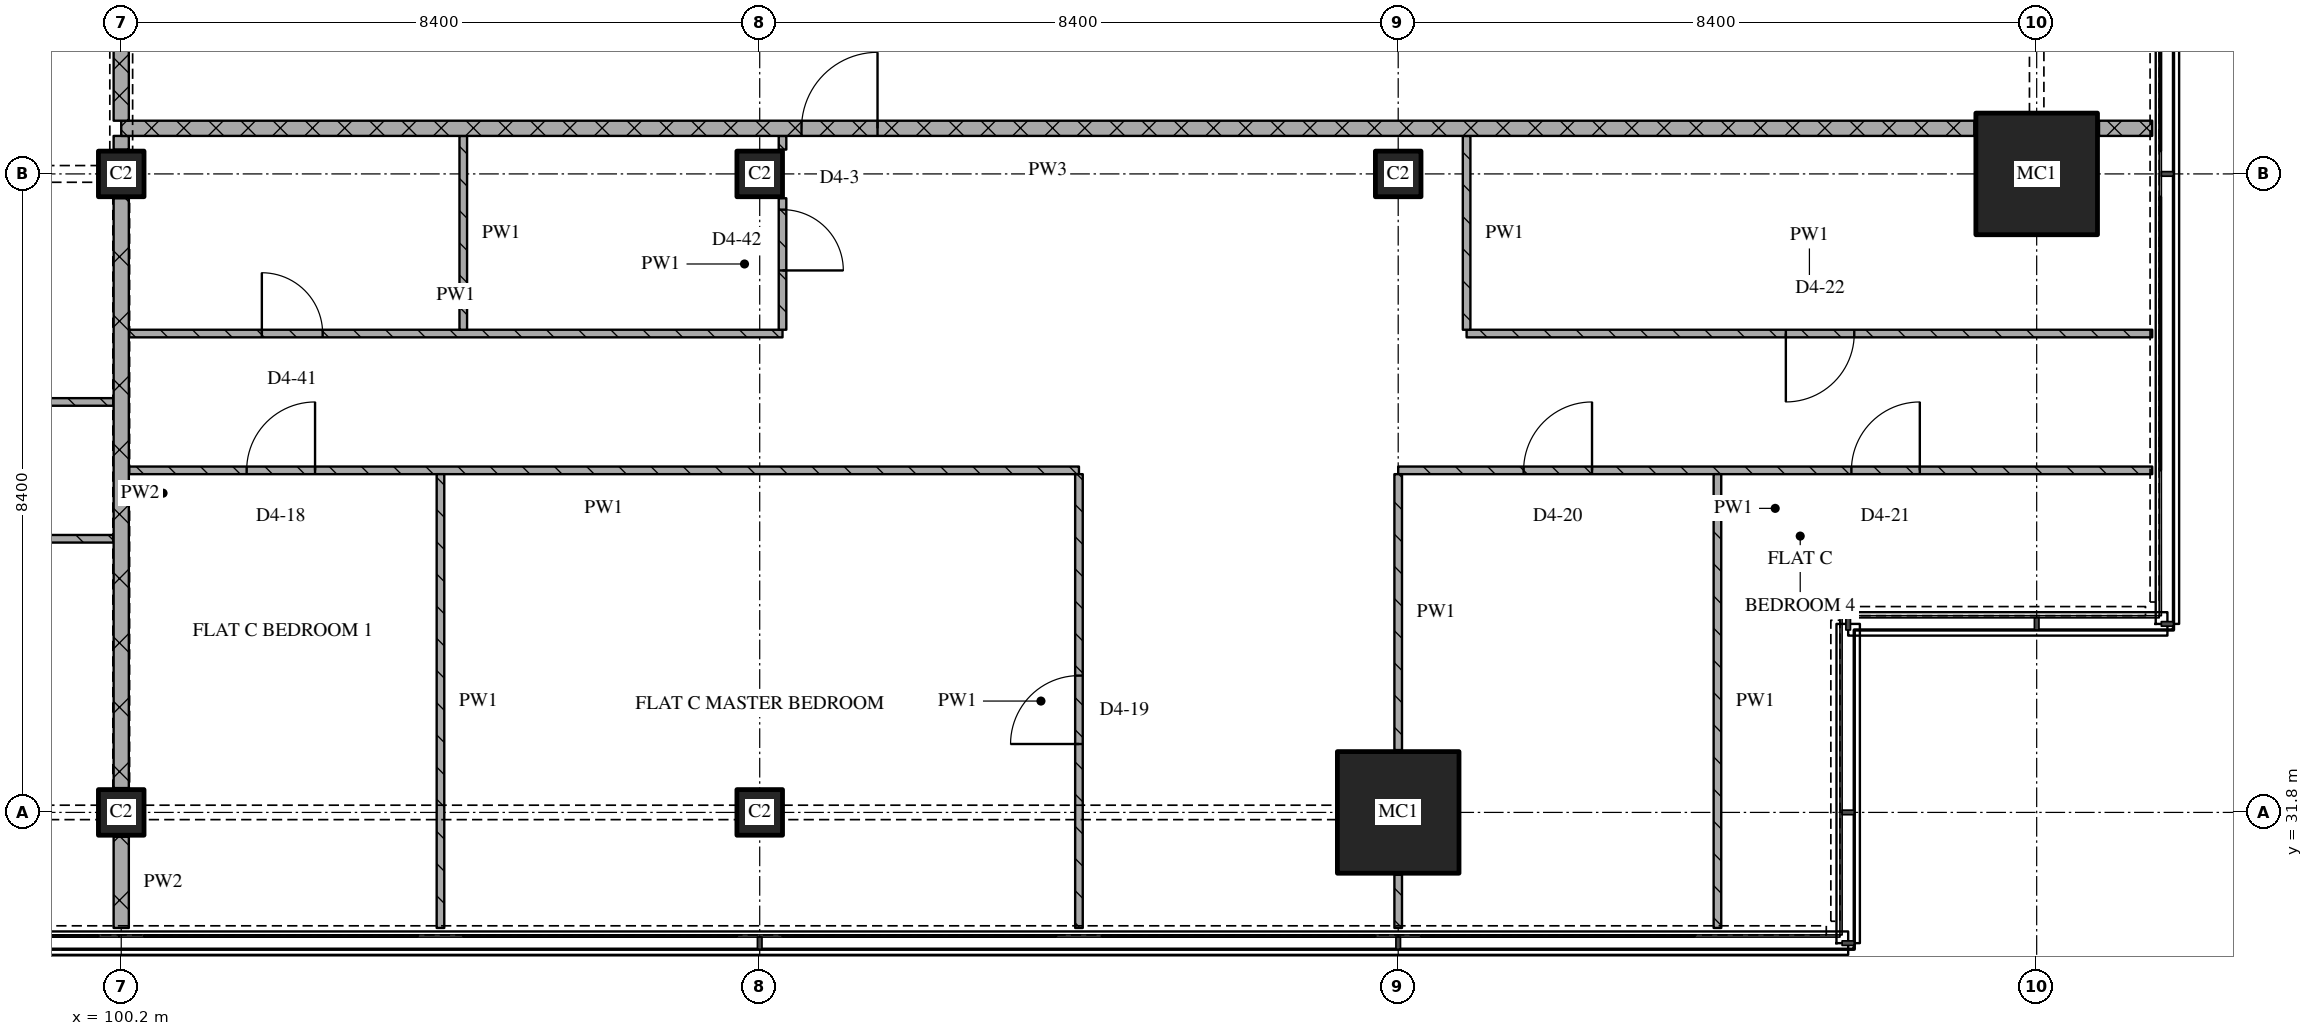
"""IFC4 building model, lengths in metres.
Left out: names, types, materials, properties, quantities, classifications, styles, units other than length and angle.
Written with IfcOpenShell. Run it as: python <this file> out.ifc"""

import sys

from ifc_helpers import new_model, si_unit, direction, frame, frame_2d, origin, origin_2d, place, context, subcontext, project, spatial, rectangle, extrude, element, fill, save


model = new_model("IFC4")
c1 = context("Model", 3, precision=1e-05, world=origin(), true_north=direction((0.0, 1.0)))
c2 = subcontext(c1, "Body", "Model", "MODEL_VIEW")
j1 = project(units=[si_unit("LENGTHUNIT", "METRE"), si_unit("PLANEANGLEUNIT", "RADIAN")], contexts=[c1])
p1 = place(None, origin())
s1 = spatial("IfcSite", under=j1, at=p1, CompositionType="ELEMENT")
p2 = place(p1, origin())
s2 = spatial("IfcBuilding", under=s1, at=p2, CompositionType="ELEMENT")
p3 = place(p2, frame((0.0, 0.0, 245.1)))
s3 = spatial("IfcBuildingStorey", under=s2, at=p3, CompositionType="ELEMENT", Elevation=245.1)
for number, where, z_axis, x_axis in (
    (1, (100.2, 31.8, 0.0), (0.0, 0.0, 1.0), (1.0, 0.0, 0.0)),
    (2, (100.2, 40.2, 0.0), (0.0, 0.0, 1.0), (1.0, 0.0, 0.0)),
    (3, (108.6, 31.8, 0.0), (0.0, 0.0, 1.0), (1.0, 0.0, 0.0)),
    (4, (108.6, 40.2, 0.0), (0.0, 0.0, 1.0), (1.0, 0.0, 0.0)),
):
    element("IfcColumn", number, at=place(p3, frame(where, z_axis=z_axis, x_axis=x_axis)), inside=s3, PredefinedType="COLUMN", context=c2, shape_type="SweptSolid", body=[
        extrude(rectangle(XDim=0.6, YDim=0.6, at=origin_2d()), origin(), (0.0, 0.0, 1.0), 3.6),
    ])
p4 = place(p3, frame((117.0, 31.8, 0.0), z_axis=(0.0, 0.0, 1.0), x_axis=(1.0, 0.0, 0.0)))
e5 = element("IfcColumn", 5, at=p4, inside=s3, PredefinedType="COLUMN", context=c2, shape_type="SweptSolid", body=[
    extrude(rectangle(XDim=1.6, YDim=1.6, at=origin_2d()), origin(), (0.0, 0.0, 1.0), 3.6),
])
p5 = place(p3, frame((117.0, 40.2, 0.0), z_axis=(0.0, 0.0, 1.0), x_axis=(1.0, 0.0, 0.0)))
e6 = element("IfcColumn", 6, at=p5, inside=s3, PredefinedType="COLUMN", context=c2, shape_type="SweptSolid", body=[
    extrude(rectangle(XDim=0.6, YDim=0.6, at=origin_2d()), origin(), (0.0, 0.0, 1.0), 3.6),
])
p6 = place(p3, frame((125.4, 40.2, 0.0), z_axis=(0.0, 0.0, 1.0), x_axis=(1.0, 0.0, 0.0)))
e7 = element("IfcColumn", 7, at=p6, inside=s3, PredefinedType="COLUMN", context=c2, shape_type="SweptSolid", body=[
    extrude(rectangle(XDim=1.6, YDim=1.6, at=origin_2d()), origin(), (0.0, 0.0, 1.0), 3.6),
])
p7 = place(p3, frame((100.1, 35.4, 0.0), z_axis=(0.0, 0.0, 1.0), x_axis=(-1.0, 0.0, 0.0)))
e8 = element("IfcWall", 8, at=p7, inside=s3, PredefinedType="PARTITIONING", context=c2, shape_type="SweptSolid", body=[
    extrude(rectangle(XDim=20.9, YDim=0.1, at=frame_2d((10.45, 0.0))), origin(), (0.0, 0.0, 1.0), 3.32),
])
p8 = place(p7, frame((1.55, 0.0, 0.0)))
e9 = element("IfcOpeningElement", 9, at=p8, cuts=e8, PredefinedType="OPENING", context=c2, shape_type="SweptSolid", body=[
    extrude(rectangle(XDim=0.9, YDim=2.1, at=frame_2d((0.45, 1.05))), frame((0.0, 0.06, 0.0), z_axis=(0.0, -1.0, 0.0), x_axis=(1.0, 0.0, 0.0)), (0.0, 0.0, 1.0), 0.12),
])
p9 = place(p7, frame((7.85, 0.0, 0.0)))
e10 = element("IfcOpeningElement", 10, at=p9, cuts=e8, PredefinedType="OPENING", context=c2, shape_type="SweptSolid", body=[
    extrude(rectangle(XDim=0.9, YDim=2.1, at=frame_2d((0.45, 1.05))), frame((0.0, 0.06, 0.0), z_axis=(0.0, -1.0, 0.0), x_axis=(1.0, 0.0, 0.0)), (0.0, 0.0, 1.0), 0.12),
])
p10 = place(p7, frame((16.25, 0.0, 0.0)))
e11 = element("IfcOpeningElement", 11, at=p10, cuts=e8, PredefinedType="OPENING", context=c2, shape_type="SweptSolid", body=[
    extrude(rectangle(XDim=0.9, YDim=2.1, at=frame_2d((0.45, 1.05))), frame((0.0, 0.06, 0.0), z_axis=(0.0, -1.0, 0.0), x_axis=(1.0, 0.0, 0.0)), (0.0, 0.0, 1.0), 0.12),
])
p11 = place(p3, frame((112.8, 36.3, 0.0), z_axis=(0.0, 0.0, 1.0), x_axis=(-1.0, 0.0, 0.0)))
e12 = element("IfcWall", 12, at=p11, inside=s3, PredefinedType="PARTITIONING", context=c2, shape_type="SweptSolid", body=[
    extrude(rectangle(XDim=12.5, YDim=0.1, at=frame_2d((6.25, 0.0))), origin(), (0.0, 0.0, 1.0), 3.32),
])
p12 = place(p11, frame((10.05, 0.0, 0.0)))
e13 = element("IfcOpeningElement", 13, at=p12, cuts=e12, PredefinedType="OPENING", context=c2, shape_type="SweptSolid", body=[
    extrude(rectangle(XDim=0.9, YDim=2.1, at=frame_2d((0.45, 1.05))), frame((0.0, 0.06, 0.0), z_axis=(0.0, -1.0, 0.0), x_axis=(1.0, 0.0, 0.0)), (0.0, 0.0, 1.0), 0.12),
])
p13 = place(p3, frame((126.92, 36.3, 0.0), z_axis=(0.0, 0.0, 1.0), x_axis=(-1.0, 0.0, 0.0)))
e14 = element("IfcWall", 14, at=p13, inside=s3, PredefinedType="PARTITIONING", context=c2, shape_type="SweptSolid", body=[
    extrude(rectangle(XDim=9.92, YDim=0.1, at=frame_2d((4.96, 0.0))), origin(), (0.0, 0.0, 1.0), 3.32),
])
p14 = place(p13, frame((3.058, 0.0, 0.0)))
e15 = element("IfcOpeningElement", 15, at=p14, cuts=e14, PredefinedType="OPENING", context=c2, shape_type="SweptSolid", body=[
    extrude(rectangle(XDim=0.9, YDim=2.1, at=frame_2d((0.45, 1.05))), frame((0.0, 0.06, 0.0), z_axis=(0.0, -1.0, 0.0), x_axis=(1.0, 0.0, 0.0)), (0.0, 0.0, 1.0), 0.12),
])
p15 = place(p13, frame((7.37, 0.0, 0.0)))
e16 = element("IfcOpeningElement", 16, at=p15, cuts=e14, PredefinedType="OPENING", context=c2, shape_type="SweptSolid", body=[
    extrude(rectangle(XDim=0.9, YDim=2.1, at=frame_2d((0.45, 1.05))), frame((0.0, 0.06, 0.0), z_axis=(0.0, -1.0, 0.0), x_axis=(1.0, 0.0, 0.0)), (0.0, 0.0, 1.0), 0.12),
])
p16 = place(p3, frame((91.2, 37.2, 0.0), z_axis=(0.0, 0.0, 1.0), x_axis=(1.0, 0.0, 0.0)))
e17 = element("IfcWall", 17, at=p16, inside=s3, PredefinedType="PARTITIONING", context=c2, shape_type="SweptSolid", body=[
    extrude(rectangle(XDim=8.9, YDim=0.1, at=frame_2d((4.45, 0.0))), origin(), (0.0, 0.0, 1.0), 3.32),
])
p17 = place(p16, frame((6.308, 0.0, 0.0)))
e18 = element("IfcOpeningElement", 18, at=p17, cuts=e17, PredefinedType="OPENING", context=c2, shape_type="SweptSolid", body=[
    extrude(rectangle(XDim=0.8, YDim=2.1, at=frame_2d((0.4, 1.05))), frame((0.0, 0.06, 0.0), z_axis=(0.0, -1.0, 0.0), x_axis=(1.0, 0.0, 0.0)), (0.0, 0.0, 1.0), 0.12),
])
p18 = place(p3, frame((100.3, 38.1, 0.0), z_axis=(0.0, 0.0, 1.0), x_axis=(1.0, 0.0, 0.0)))
e19 = element("IfcWall", 19, at=p18, inside=s3, PredefinedType="PARTITIONING", context=c2, shape_type="SweptSolid", body=[
    extrude(rectangle(XDim=8.6, YDim=0.1, at=frame_2d((4.3, 0.0))), origin(), (0.0, 0.0, 1.0), 3.32),
])
p19 = place(p18, frame((1.75, 0.0, 0.0)))
e20 = element("IfcOpeningElement", 20, at=p19, cuts=e19, PredefinedType="OPENING", context=c2, shape_type="SweptSolid", body=[
    extrude(rectangle(XDim=0.8, YDim=2.1, at=frame_2d((0.4, 1.05))), frame((0.0, 0.06, 0.0), z_axis=(0.0, -1.0, 0.0), x_axis=(1.0, 0.0, 0.0)), (0.0, 0.0, 1.0), 0.12),
])
p20 = place(p3, frame((117.9, 38.1, 0.0), z_axis=(0.0, 0.0, 1.0), x_axis=(1.0, 0.0, 0.0)))
e21 = element("IfcWall", 21, at=p20, inside=s3, PredefinedType="PARTITIONING", context=c2, shape_type="SweptSolid", body=[
    extrude(rectangle(XDim=9.02, YDim=0.1, at=frame_2d((4.51, 0.0))), origin(), (0.0, 0.0, 1.0), 3.32),
])
p21 = place(p20, frame((4.2, 0.0, 0.0)))
e22 = element("IfcOpeningElement", 22, at=p21, cuts=e21, PredefinedType="OPENING", context=c2, shape_type="SweptSolid", body=[
    extrude(rectangle(XDim=0.9, YDim=2.1, at=frame_2d((0.45, 1.05))), frame((0.0, 0.06, 0.0), z_axis=(0.0, -1.0, 0.0), x_axis=(1.0, 0.0, 0.0)), (0.0, 0.0, 1.0), 0.12),
])
p22 = place(p3, frame((124.58, 40.8, 0.0), z_axis=(0.0, 0.0, 1.0), x_axis=(-1.0, 0.0, 0.0)))
e23 = element("IfcWall", 23, at=p22, inside=s3, PredefinedType="PARTITIONING", context=c2, shape_type="SweptSolid", body=[
    extrude(rectangle(XDim=24.38, YDim=0.2, at=frame_2d((12.19, 0.0))), origin(), (0.0, 0.0, 1.0), 3.32),
])
p23 = place(p22, frame((14.43, 0.0, 0.0)))
e24 = element("IfcOpeningElement", 24, at=p23, cuts=e23, PredefinedType="OPENING", context=c2, shape_type="SweptSolid", body=[
    extrude(rectangle(XDim=1.0, YDim=2.1, at=frame_2d((0.5, 1.05))), frame((0.0, 0.11, 0.0), z_axis=(0.0, -1.0, 0.0), x_axis=(1.0, 0.0, 0.0)), (0.0, 0.0, 1.0), 0.22),
])
p24 = place(p3, frame((126.22, 40.8, 0.0), z_axis=(0.0, 0.0, 1.0), x_axis=(1.0, 0.0, 0.0)))
e25 = element("IfcWall", 25, at=p24, inside=s3, PredefinedType="PARTITIONING", context=c2, shape_type="SweptSolid", body=[
    extrude(rectangle(XDim=0.7, YDim=0.2, at=frame_2d((0.35, 0.0))), origin(), (0.0, 0.0, 1.0), 3.32),
])
p25 = place(p3, frame((100.2, 43.1, 0.0), z_axis=(0.0, 0.0, 1.0), x_axis=(0.0, -1.0, 0.0)))
e26 = element("IfcWall", 26, at=p25, inside=s3, PredefinedType="PARTITIONING", context=c2, shape_type="SweptSolid", body=[
    extrude(rectangle(XDim=2.2, YDim=0.2, at=frame_2d((1.1, 0.0))), origin(), (0.0, 0.0, 1.0), 2.53),
])
p26 = place(p3, frame((100.2, 31.48, 0.0), z_axis=(0.0, 0.0, 1.0), x_axis=(0.0, -1.0, 0.0)))
e27 = element("IfcWall", 27, at=p26, inside=s3, PredefinedType="PARTITIONING", context=c2, shape_type="SweptSolid", body=[
    extrude(rectangle(XDim=1.2, YDim=0.2, at=frame_2d((0.6, 0.0))), origin(), (0.0, 0.0, 1.0), 3.32),
])
p27 = place(p3, frame((100.2, 39.88, 0.0), z_axis=(0.0, 0.0, 1.0), x_axis=(0.0, -1.0, 0.0)))
e28 = element("IfcWall", 28, at=p27, inside=s3, PredefinedType="PARTITIONING", context=c2, shape_type="SweptSolid", body=[
    extrude(rectangle(XDim=7.76, YDim=0.2, at=frame_2d((3.88, 0.0))), origin(), (0.0, 0.0, 1.0), 2.72),
])
p28 = place(p3, frame((100.2, 40.7, 0.0), z_axis=(0.0, 0.0, 1.0), x_axis=(0.0, -1.0, 0.0)))
e29 = element("IfcWall", 29, at=p28, inside=s3, PredefinedType="PARTITIONING", context=c2, shape_type="SweptSolid", body=[
    extrude(rectangle(XDim=0.18, YDim=0.2, at=frame_2d((0.09, 0.0))), origin(), (0.0, 0.0, 1.0), 3.32),
])
p29 = place(p3, frame((104.4, 36.25, 0.0), z_axis=(0.0, 0.0, 1.0), x_axis=(0.0, -1.0, 0.0)))
e30 = element("IfcWall", 30, at=p29, inside=s3, PredefinedType="PARTITIONING", context=c2, shape_type="SweptSolid", body=[
    extrude(rectangle(XDim=5.97, YDim=0.1, at=frame_2d((2.985, 0.0))), origin(), (0.0, 0.0, 1.0), 3.32),
])
p30 = place(p3, frame((104.7, 40.7, 0.0), z_axis=(0.0, 0.0, 1.0), x_axis=(0.0, -1.0, 0.0)))
e31 = element("IfcWall", 31, at=p30, inside=s3, PredefinedType="PARTITIONING", context=c2, shape_type="SweptSolid", body=[
    extrude(rectangle(XDim=2.55, YDim=0.1, at=frame_2d((1.275, 0.0))), origin(), (0.0, 0.0, 1.0), 3.32),
])
p31 = place(p3, frame((108.9, 38.15, 0.0), z_axis=(0.0, 0.0, 1.0), x_axis=(0.0, 1.0, 0.0)))
e32 = element("IfcWall", 32, at=p31, inside=s3, PredefinedType="PARTITIONING", context=c2, shape_type="SweptSolid", body=[
    extrude(rectangle(XDim=1.73, YDim=0.1, at=frame_2d((0.865, 0.0))), origin(), (0.0, 0.0, 1.0), 3.32),
])
p32 = place(p31, frame((0.78, 0.0, 0.0)))
e33 = element("IfcOpeningElement", 33, at=p32, cuts=e32, PredefinedType="OPENING", context=c2, shape_type="SweptSolid", body=[
    extrude(rectangle(XDim=0.8, YDim=2.1, at=frame_2d((0.4, 1.05))), frame((0.0, 0.06, 0.0), z_axis=(0.0, -1.0, 0.0), x_axis=(1.0, 0.0, 0.0)), (0.0, 0.0, 1.0), 0.12),
])
p33 = place(p3, frame((108.9, 40.7, 0.0), z_axis=(0.0, 0.0, 1.0), x_axis=(0.0, -1.0, 0.0)))
e34 = element("IfcWall", 34, at=p33, inside=s3, PredefinedType="PARTITIONING", context=c2, shape_type="SweptSolid", body=[
    extrude(rectangle(XDim=0.18, YDim=0.1, at=frame_2d((0.09, 0.0))), origin(), (0.0, 0.0, 1.0), 3.32),
])
p34 = place(p3, frame((112.8, 30.28, 0.0), z_axis=(0.0, 0.0, 1.0), x_axis=(0.0, 1.0, 0.0)))
e35 = element("IfcWall", 35, at=p34, inside=s3, PredefinedType="PARTITIONING", context=c2, shape_type="SweptSolid", body=[
    extrude(rectangle(XDim=5.97, YDim=0.1, at=frame_2d((2.985, 0.0))), origin(), (0.0, 0.0, 1.0), 3.32),
])
p35 = place(p34, frame((2.42, 0.0, 0.0)))
e36 = element("IfcOpeningElement", 36, at=p35, cuts=e35, PredefinedType="OPENING", context=c2, shape_type="SweptSolid", body=[
    extrude(rectangle(XDim=0.9, YDim=2.1, at=frame_2d((0.45, 1.05))), frame((0.0, 0.06, 0.0), z_axis=(0.0, -1.0, 0.0), x_axis=(1.0, 0.0, 0.0)), (0.0, 0.0, 1.0), 0.12),
])
p36 = place(p3, frame((117.0, 30.98, 0.0), z_axis=(0.0, 0.0, 1.0), x_axis=(0.0, -1.0, 0.0)))
e37 = element("IfcWall", 37, at=p36, inside=s3, PredefinedType="PARTITIONING", context=c2, shape_type="SweptSolid", body=[
    extrude(rectangle(XDim=0.7, YDim=0.1, at=frame_2d((0.35, 0.0))), origin(), (0.0, 0.0, 1.0), 3.32),
])
p37 = place(p3, frame((117.0, 36.25, 0.0), z_axis=(0.0, 0.0, 1.0), x_axis=(0.0, -1.0, 0.0)))
e38 = element("IfcWall", 38, at=p37, inside=s3, PredefinedType="PARTITIONING", context=c2, shape_type="SweptSolid", body=[
    extrude(rectangle(XDim=3.63, YDim=0.1, at=frame_2d((1.815, 0.0))), origin(), (0.0, 0.0, 1.0), 3.32),
])
p38 = place(p3, frame((117.9, 40.7, 0.0), z_axis=(0.0, 0.0, 1.0), x_axis=(0.0, -1.0, 0.0)))
e39 = element("IfcWall", 39, at=p38, inside=s3, PredefinedType="PARTITIONING", context=c2, shape_type="SweptSolid", body=[
    extrude(rectangle(XDim=2.55, YDim=0.1, at=frame_2d((1.275, 0.0))), origin(), (0.0, 0.0, 1.0), 3.32),
])
p39 = place(p3, frame((121.2, 36.25, 0.0), z_axis=(0.0, 0.0, 1.0), x_axis=(0.0, -1.0, 0.0)))
e40 = element("IfcWall", 40, at=p39, inside=s3, PredefinedType="PARTITIONING", context=c2, shape_type="SweptSolid", body=[
    extrude(rectangle(XDim=5.97, YDim=0.1, at=frame_2d((2.985, 0.0))), origin(), (0.0, 0.0, 1.0), 3.32),
])
p40 = place(p12, origin())
e41 = element("IfcDoor", 41, at=p40, inside=s3, OperationType="SINGLE_SWING_RIGHT", PredefinedType="DOOR", context=c2, shape_type="SweptSolid", body=[
    extrude(rectangle(XDim=0.9, YDim=2.1, at=frame_2d((0.45, 1.05))), frame((0.0, 0.025, 0.0), z_axis=(0.0, -1.0, 0.0), x_axis=(1.0, 0.0, 0.0)), (0.0, 0.0, 1.0), 0.05),
])
fill(e13, e41)
p41 = place(p14, origin())
e42 = element("IfcDoor", 42, at=p41, inside=s3, OperationType="SINGLE_SWING_RIGHT", PredefinedType="DOOR", context=c2, shape_type="SweptSolid", body=[
    extrude(rectangle(XDim=0.9, YDim=2.1, at=frame_2d((0.45, 1.05))), frame((0.0, 0.025, 0.0), z_axis=(0.0, -1.0, 0.0), x_axis=(1.0, 0.0, 0.0)), (0.0, 0.0, 1.0), 0.05),
])
fill(e15, e42)
p42 = place(p15, origin())
e43 = element("IfcDoor", 43, at=p42, inside=s3, OperationType="SINGLE_SWING_RIGHT", PredefinedType="DOOR", context=c2, shape_type="SweptSolid", body=[
    extrude(rectangle(XDim=0.9, YDim=2.1, at=frame_2d((0.45, 1.05))), frame((0.0, 0.025, 0.0), z_axis=(0.0, -1.0, 0.0), x_axis=(1.0, 0.0, 0.0)), (0.0, 0.0, 1.0), 0.05),
])
fill(e16, e43)
p43 = place(p19, origin())
e44 = element("IfcDoor", 44, at=p43, inside=s3, OperationType="SINGLE_SWING_LEFT", PredefinedType="DOOR", context=c2, shape_type="SweptSolid", body=[
    extrude(rectangle(XDim=0.8, YDim=2.1, at=frame_2d((0.4, 1.05))), frame((0.0, 0.025, 0.0), z_axis=(0.0, -1.0, 0.0), x_axis=(1.0, 0.0, 0.0)), (0.0, 0.0, 1.0), 0.05),
])
fill(e20, e44)
p44 = place(p21, origin())
e45 = element("IfcDoor", 45, at=p44, inside=s3, OperationType="SINGLE_SWING_RIGHT", PredefinedType="DOOR", context=c2, shape_type="SweptSolid", body=[
    extrude(rectangle(XDim=0.9, YDim=2.1, at=frame_2d((0.45, 1.05))), frame((0.0, 0.025, 0.0), z_axis=(0.0, -1.0, 0.0), x_axis=(1.0, 0.0, 0.0)), (0.0, 0.0, 1.0), 0.05),
])
fill(e22, e45)
p45 = place(p23, origin())
e46 = element("IfcDoor", 46, at=p45, inside=s3, OperationType="SINGLE_SWING_RIGHT", PredefinedType="DOOR", context=c2, shape_type="SweptSolid", body=[
    extrude(rectangle(XDim=1.0, YDim=2.1, at=frame_2d((0.5, 1.05))), frame((0.0, 0.025, 0.0), z_axis=(0.0, -1.0, 0.0), x_axis=(1.0, 0.0, 0.0)), (0.0, 0.0, 1.0), 0.05),
])
fill(e24, e46)
p46 = place(p32, origin())
e47 = element("IfcDoor", 47, at=p46, inside=s3, OperationType="SINGLE_SWING_RIGHT", PredefinedType="DOOR", context=c2, shape_type="SweptSolid", body=[
    extrude(rectangle(XDim=0.8, YDim=2.1, at=frame_2d((0.4, 1.05))), frame((0.0, 0.025, 0.0), z_axis=(0.0, -1.0, 0.0), x_axis=(1.0, 0.0, 0.0)), (0.0, 0.0, 1.0), 0.05),
])
fill(e33, e47)
p47 = place(p35, origin())
e48 = element("IfcDoor", 48, at=p47, inside=s3, OperationType="SINGLE_SWING_LEFT", PredefinedType="DOOR", context=c2, shape_type="SweptSolid", body=[
    extrude(rectangle(XDim=0.9, YDim=2.1, at=frame_2d((0.45, 1.05))), frame((0.0, 0.025, 0.0), z_axis=(0.0, -1.0, 0.0), x_axis=(1.0, 0.0, 0.0)), (0.0, 0.0, 1.0), 0.05),
])
fill(e36, e48)
save(model, sys.argv[1])
